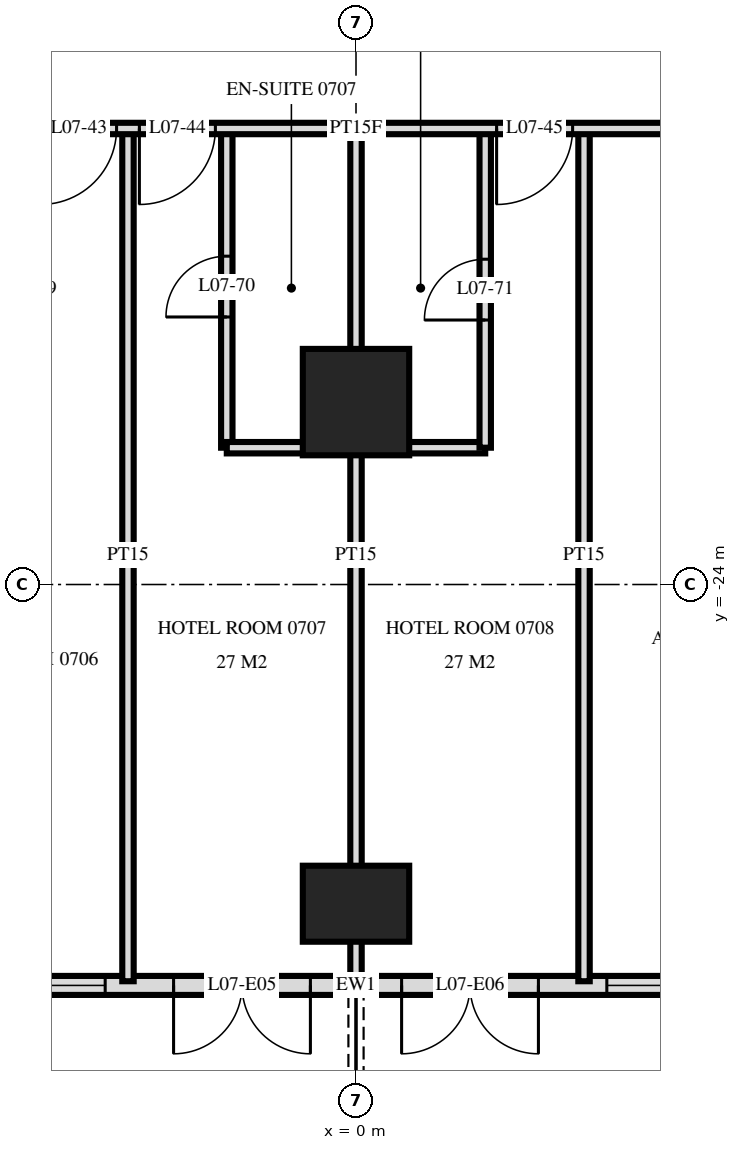
"""IFC4 building model, lengths in metres.
Left out: names, types, materials, properties, quantities, classifications, styles, units other than length and angle.
Written with IfcOpenShell. Run it as: python <this file> out.ifc"""

import sys

from ifc_helpers import new_model, si_unit, direction, frame, frame_2d, origin, origin_2d, place, context, subcontext, project, spatial, rectangle, extrude, element, fill, save


model = new_model("IFC4")
c1 = context("Model", 3, precision=1e-05, world=origin(), true_north=direction((0.0, 1.0)))
c2 = subcontext(c1, "Body", "Model", "MODEL_VIEW")
j1 = project(units=[si_unit("LENGTHUNIT", "METRE"), si_unit("PLANEANGLEUNIT", "RADIAN")], contexts=[c1])
p1 = place(None, origin())
s1 = spatial("IfcSite", under=j1, at=p1, CompositionType="ELEMENT")
p2 = place(p1, origin())
s2 = spatial("IfcBuilding", under=s1, at=p2, CompositionType="ELEMENT")
p3 = place(p2, frame((0.0, 0.0, 34.8)))
s3 = spatial("IfcBuildingStorey", under=s2, at=p3, CompositionType="ELEMENT", Elevation=34.8)
p4 = place(p3, frame((0.0, -28.2, 0.0), z_axis=(0.0, 0.0, 1.0), x_axis=(1.0, 0.0, 0.0)))
e1 = element("IfcColumn", 1, at=p4, inside=s3, PredefinedType="COLUMN", context=c2, shape_type="SweptSolid", body=[
    extrude(rectangle(XDim=1.4, YDim=1.0, at=origin_2d()), origin(), (0.0, 0.0, 1.0), 3.6),
])
p5 = place(p3, frame((0.0, -21.6, 0.0), z_axis=(0.0, 0.0, 1.0), x_axis=(1.0, 0.0, 0.0)))
e2 = element("IfcColumn", 2, at=p5, inside=s3, PredefinedType="COLUMN", context=c2, shape_type="SweptSolid", body=[
    extrude(rectangle(XDim=1.4, YDim=1.4, at=origin_2d()), origin(), (0.0, 0.0, 1.0), 3.6),
])
p6 = place(p3, frame((-28.775, -29.275, 0.0), z_axis=(0.0, 0.0, 1.0), x_axis=(1.0, 0.0, 0.0)))
e3 = element("IfcWall", 3, at=p6, inside=s3, PredefinedType="SOLIDWALL", context=c2, shape_type="SweptSolid", body=[
    extrude(rectangle(XDim=57.551, YDim=0.25, at=frame_2d((28.775, 0.0))), origin(), (0.0, 0.0, 1.0), 3.32),
])
p7 = place(p6, frame((0.575, 0.0, 0.0)))
e4 = element("IfcOpeningElement", 4, at=p7, cuts=e3, PredefinedType="OPENING", context=c2, shape_type="SweptSolid", body=[
    extrude(rectangle(XDim=1.8, YDim=2.4, at=frame_2d((0.9, 1.2))), frame((0.0, 0.135, 0.0), z_axis=(0.0, -1.0, 0.0), x_axis=(1.0, 0.0, 0.0)), (0.0, 0.0, 1.0), 0.27),
])
p8 = place(p6, frame((5.375, 0.0, 0.0)))
e5 = element("IfcOpeningElement", 5, at=p8, cuts=e3, PredefinedType="OPENING", context=c2, shape_type="SweptSolid", body=[
    extrude(rectangle(XDim=1.8, YDim=2.4, at=frame_2d((0.9, 1.2))), frame((0.0, 0.135, 0.0), z_axis=(0.0, -1.0, 0.0), x_axis=(1.0, 0.0, 0.0)), (0.0, 0.0, 1.0), 0.27),
])
p9 = place(p6, frame((8.075, 0.0, 0.3)))
e6 = element("IfcOpeningElement", 6, at=p9, cuts=e3, PredefinedType="OPENING", context=c2, shape_type="SweptSolid", body=[
    extrude(rectangle(XDim=2.4, YDim=2.1, at=frame_2d((1.2, 1.05))), frame((0.0, 0.135, 0.0), z_axis=(0.0, -1.0, 0.0), x_axis=(1.0, 0.0, 0.0)), (0.0, 0.0, 1.0), 0.27),
])
p10 = place(p6, frame((11.375, 0.0, 0.0)))
e7 = element("IfcOpeningElement", 7, at=p10, cuts=e3, PredefinedType="OPENING", context=c2, shape_type="SweptSolid", body=[
    extrude(rectangle(XDim=1.8, YDim=2.4, at=frame_2d((0.9, 1.2))), frame((0.0, 0.135, 0.0), z_axis=(0.0, -1.0, 0.0), x_axis=(1.0, 0.0, 0.0)), (0.0, 0.0, 1.0), 0.27),
])
p11 = place(p6, frame((14.075, 0.0, 0.3)))
e8 = element("IfcOpeningElement", 8, at=p11, cuts=e3, PredefinedType="OPENING", context=c2, shape_type="SweptSolid", body=[
    extrude(rectangle(XDim=2.4, YDim=2.1, at=frame_2d((1.2, 1.05))), frame((0.0, 0.135, 0.0), z_axis=(0.0, -1.0, 0.0), x_axis=(1.0, 0.0, 0.0)), (0.0, 0.0, 1.0), 0.27),
])
p12 = place(p6, frame((17.375, 0.0, 0.0)))
e9 = element("IfcOpeningElement", 9, at=p12, cuts=e3, PredefinedType="OPENING", context=c2, shape_type="SweptSolid", body=[
    extrude(rectangle(XDim=1.8, YDim=2.4, at=frame_2d((0.9, 1.2))), frame((0.0, 0.135, 0.0), z_axis=(0.0, -1.0, 0.0), x_axis=(1.0, 0.0, 0.0)), (0.0, 0.0, 1.0), 0.27),
])
p13 = place(p6, frame((20.075, 0.0, 0.3)))
e10 = element("IfcOpeningElement", 10, at=p13, cuts=e3, PredefinedType="OPENING", context=c2, shape_type="SweptSolid", body=[
    extrude(rectangle(XDim=2.4, YDim=2.1, at=frame_2d((1.2, 1.05))), frame((0.0, 0.135, 0.0), z_axis=(0.0, -1.0, 0.0), x_axis=(1.0, 0.0, 0.0)), (0.0, 0.0, 1.0), 0.27),
])
p14 = place(p6, frame((23.075, 0.0, 0.3)))
e11 = element("IfcOpeningElement", 11, at=p14, cuts=e3, PredefinedType="OPENING", context=c2, shape_type="SweptSolid", body=[
    extrude(rectangle(XDim=2.4, YDim=2.1, at=frame_2d((1.2, 1.05))), frame((0.0, 0.135, 0.0), z_axis=(0.0, -1.0, 0.0), x_axis=(1.0, 0.0, 0.0)), (0.0, 0.0, 1.0), 0.27),
])
p15 = place(p6, frame((26.375, 0.0, 0.0)))
e12 = element("IfcOpeningElement", 12, at=p15, cuts=e3, PredefinedType="OPENING", context=c2, shape_type="SweptSolid", body=[
    extrude(rectangle(XDim=1.8, YDim=2.4, at=frame_2d((0.9, 1.2))), frame((0.0, 0.135, 0.0), z_axis=(0.0, -1.0, 0.0), x_axis=(1.0, 0.0, 0.0)), (0.0, 0.0, 1.0), 0.27),
])
p16 = place(p6, frame((29.375, 0.0, 0.0)))
e13 = element("IfcOpeningElement", 13, at=p16, cuts=e3, PredefinedType="OPENING", context=c2, shape_type="SweptSolid", body=[
    extrude(rectangle(XDim=1.8, YDim=2.4, at=frame_2d((0.9, 1.2))), frame((0.0, 0.135, 0.0), z_axis=(0.0, -1.0, 0.0), x_axis=(1.0, 0.0, 0.0)), (0.0, 0.0, 1.0), 0.27),
])
p17 = place(p6, frame((32.075, 0.0, 0.3)))
e14 = element("IfcOpeningElement", 14, at=p17, cuts=e3, PredefinedType="OPENING", context=c2, shape_type="SweptSolid", body=[
    extrude(rectangle(XDim=2.4, YDim=2.1, at=frame_2d((1.2, 1.05))), frame((0.0, 0.135, 0.0), z_axis=(0.0, -1.0, 0.0), x_axis=(1.0, 0.0, 0.0)), (0.0, 0.0, 1.0), 0.27),
])
p18 = place(p6, frame((35.375, 0.0, 0.0)))
e15 = element("IfcOpeningElement", 15, at=p18, cuts=e3, PredefinedType="OPENING", context=c2, shape_type="SweptSolid", body=[
    extrude(rectangle(XDim=1.8, YDim=2.4, at=frame_2d((0.9, 1.2))), frame((0.0, 0.135, 0.0), z_axis=(0.0, -1.0, 0.0), x_axis=(1.0, 0.0, 0.0)), (0.0, 0.0, 1.0), 0.27),
])
p19 = place(p6, frame((38.075, 0.0, 0.3)))
e16 = element("IfcOpeningElement", 16, at=p19, cuts=e3, PredefinedType="OPENING", context=c2, shape_type="SweptSolid", body=[
    extrude(rectangle(XDim=2.4, YDim=2.1, at=frame_2d((1.2, 1.05))), frame((0.0, 0.135, 0.0), z_axis=(0.0, -1.0, 0.0), x_axis=(1.0, 0.0, 0.0)), (0.0, 0.0, 1.0), 0.27),
])
p20 = place(p6, frame((41.375, 0.0, 0.0)))
e17 = element("IfcOpeningElement", 17, at=p20, cuts=e3, PredefinedType="OPENING", context=c2, shape_type="SweptSolid", body=[
    extrude(rectangle(XDim=1.8, YDim=2.4, at=frame_2d((0.9, 1.2))), frame((0.0, 0.135, 0.0), z_axis=(0.0, -1.0, 0.0), x_axis=(1.0, 0.0, 0.0)), (0.0, 0.0, 1.0), 0.27),
])
p21 = place(p6, frame((44.075, 0.0, 0.3)))
e18 = element("IfcOpeningElement", 18, at=p21, cuts=e3, PredefinedType="OPENING", context=c2, shape_type="SweptSolid", body=[
    extrude(rectangle(XDim=2.4, YDim=2.1, at=frame_2d((1.2, 1.05))), frame((0.0, 0.135, 0.0), z_axis=(0.0, -1.0, 0.0), x_axis=(1.0, 0.0, 0.0)), (0.0, 0.0, 1.0), 0.27),
])
p22 = place(p6, frame((47.375, 0.0, 0.0)))
e19 = element("IfcOpeningElement", 19, at=p22, cuts=e3, PredefinedType="OPENING", context=c2, shape_type="SweptSolid", body=[
    extrude(rectangle(XDim=1.8, YDim=2.4, at=frame_2d((0.9, 1.2))), frame((0.0, 0.135, 0.0), z_axis=(0.0, -1.0, 0.0), x_axis=(1.0, 0.0, 0.0)), (0.0, 0.0, 1.0), 0.27),
])
p23 = place(p6, frame((50.075, 0.0, 0.3)))
e20 = element("IfcOpeningElement", 20, at=p23, cuts=e3, PredefinedType="OPENING", context=c2, shape_type="SweptSolid", body=[
    extrude(rectangle(XDim=2.4, YDim=2.1, at=frame_2d((1.2, 1.05))), frame((0.0, 0.135, 0.0), z_axis=(0.0, -1.0, 0.0), x_axis=(1.0, 0.0, 0.0)), (0.0, 0.0, 1.0), 0.27),
])
p24 = place(p6, frame((53.375, 0.0, 0.0)))
e21 = element("IfcOpeningElement", 21, at=p24, cuts=e3, PredefinedType="OPENING", context=c2, shape_type="SweptSolid", body=[
    extrude(rectangle(XDim=1.8, YDim=2.4, at=frame_2d((0.9, 1.2))), frame((0.0, 0.135, 0.0), z_axis=(0.0, -1.0, 0.0), x_axis=(1.0, 0.0, 0.0)), (0.0, 0.0, 1.0), 0.27),
])
p25 = place(p3, frame((3.0, -29.22, 0.0), z_axis=(0.0, 0.0, 1.0), x_axis=(0.0, 1.0, 0.0)))
e22 = element("IfcWall", 22, at=p25, inside=s3, PredefinedType="PARTITIONING", context=c2, shape_type="SweptSolid", body=[
    extrude(rectangle(XDim=11.22, YDim=0.15, at=frame_2d((5.61, 0.0))), origin(), (0.0, 0.0, 1.0), 3.32),
])
p26 = place(p3, frame((1.7, -22.2, 0.0), z_axis=(0.0, 0.0, 1.0), x_axis=(0.0, 1.0, 0.0)))
e23 = element("IfcWall", 23, at=p26, inside=s3, PredefinedType="PARTITIONING", context=c2, shape_type="SweptSolid", body=[
    extrude(rectangle(XDim=4.2, YDim=0.15, at=frame_2d((2.1, 0.0))), origin(), (0.0, 0.0, 1.0), 3.32),
])
p27 = place(p26, frame((1.68, 0.0, 0.0)))
e24 = element("IfcOpeningElement", 24, at=p27, cuts=e23, PredefinedType="OPENING", context=c2, shape_type="SweptSolid", body=[
    extrude(rectangle(XDim=0.8, YDim=2.1, at=frame_2d((0.4, 1.05))), frame((0.0, 0.085, 0.0), z_axis=(0.0, -1.0, 0.0), x_axis=(1.0, 0.0, 0.0)), (0.0, 0.0, 1.0), 0.17),
])
p28 = place(p3, frame((0.0, -29.22, 0.0), z_axis=(0.0, 0.0, 1.0), x_axis=(0.0, 1.0, 0.0)))
e25 = element("IfcWall", 25, at=p28, inside=s3, PredefinedType="PARTITIONING", context=c2, shape_type="SweptSolid", body=[
    extrude(rectangle(XDim=11.22, YDim=0.15, at=frame_2d((5.61, 0.0))), origin(), (0.0, 0.0, 1.0), 3.32),
])
p29 = place(p3, frame((-1.7, -22.2, 0.0), z_axis=(0.0, 0.0, 1.0), x_axis=(0.0, 1.0, 0.0)))
e26 = element("IfcWall", 26, at=p29, inside=s3, PredefinedType="PARTITIONING", context=c2, shape_type="SweptSolid", body=[
    extrude(rectangle(XDim=4.2, YDim=0.15, at=frame_2d((2.1, 0.0))), origin(), (0.0, 0.0, 1.0), 3.32),
])
p30 = place(p29, frame((1.72, 0.0, 0.0)))
e27 = element("IfcOpeningElement", 27, at=p30, cuts=e26, PredefinedType="OPENING", context=c2, shape_type="SweptSolid", body=[
    extrude(rectangle(XDim=0.8, YDim=2.1, at=frame_2d((0.4, 1.05))), frame((0.0, 0.085, 0.0), z_axis=(0.0, -1.0, 0.0), x_axis=(1.0, 0.0, 0.0)), (0.0, 0.0, 1.0), 0.17),
])
p31 = place(p3, frame((-3.0, -29.22, 0.0), z_axis=(0.0, 0.0, 1.0), x_axis=(0.0, 1.0, 0.0)))
e28 = element("IfcWall", 28, at=p31, inside=s3, PredefinedType="PARTITIONING", context=c2, shape_type="SweptSolid", body=[
    extrude(rectangle(XDim=11.22, YDim=0.15, at=frame_2d((5.61, 0.0))), origin(), (0.0, 0.0, 1.0), 3.32),
])
p32 = place(p3, frame((-1.7, -22.2, 0.0), z_axis=(0.0, 0.0, 1.0), x_axis=(1.0, 0.0, 0.0)))
e29 = element("IfcWall", 29, at=p32, inside=s3, PredefinedType="PARTITIONING", context=c2, shape_type="SweptSolid", body=[
    extrude(rectangle(XDim=3.4, YDim=0.15, at=frame_2d((1.7, 0.0))), origin(), (0.0, 0.0, 1.0), 3.32),
])
p33 = place(p3, frame((-33.12, -18.0, 0.0), z_axis=(0.0, 0.0, 1.0), x_axis=(1.0, 0.0, 0.0)))
e30 = element("IfcWall", 30, at=p33, inside=s3, PredefinedType="PARTITIONING", context=c2, shape_type="SweptSolid", body=[
    extrude(rectangle(XDim=66.24, YDim=0.15, at=frame_2d((33.12, 0.0))), origin(), (0.0, 0.0, 1.0), 3.32),
])
p34 = place(p33, frame((12.27, 0.0, 0.0)))
e31 = element("IfcOpeningElement", 31, at=p34, cuts=e30, PredefinedType="OPENING", context=c2, shape_type="SweptSolid", body=[
    extrude(rectangle(XDim=1.0, YDim=2.1, at=frame_2d((0.5, 1.05))), frame((0.0, 0.085, 0.0), z_axis=(0.0, -1.0, 0.0), x_axis=(1.0, 0.0, 0.0)), (0.0, 0.0, 1.0), 0.17),
])
p35 = place(p33, frame((16.97, 0.0, 0.0)))
e32 = element("IfcOpeningElement", 32, at=p35, cuts=e30, PredefinedType="OPENING", context=c2, shape_type="SweptSolid", body=[
    extrude(rectangle(XDim=1.0, YDim=2.1, at=frame_2d((0.5, 1.05))), frame((0.0, 0.085, 0.0), z_axis=(0.0, -1.0, 0.0), x_axis=(1.0, 0.0, 0.0)), (0.0, 0.0, 1.0), 0.17),
])
p36 = place(p33, frame((18.27, 0.0, 0.0)))
e33 = element("IfcOpeningElement", 33, at=p36, cuts=e30, PredefinedType="OPENING", context=c2, shape_type="SweptSolid", body=[
    extrude(rectangle(XDim=1.0, YDim=2.1, at=frame_2d((0.5, 1.05))), frame((0.0, 0.085, 0.0), z_axis=(0.0, -1.0, 0.0), x_axis=(1.0, 0.0, 0.0)), (0.0, 0.0, 1.0), 0.17),
])
p37 = place(p33, frame((22.97, 0.0, 0.0)))
e34 = element("IfcOpeningElement", 34, at=p37, cuts=e30, PredefinedType="OPENING", context=c2, shape_type="SweptSolid", body=[
    extrude(rectangle(XDim=1.0, YDim=2.1, at=frame_2d((0.5, 1.05))), frame((0.0, 0.085, 0.0), z_axis=(0.0, -1.0, 0.0), x_axis=(1.0, 0.0, 0.0)), (0.0, 0.0, 1.0), 0.17),
])
p38 = place(p33, frame((24.27, 0.0, 0.0)))
e35 = element("IfcOpeningElement", 35, at=p38, cuts=e30, PredefinedType="OPENING", context=c2, shape_type="SweptSolid", body=[
    extrude(rectangle(XDim=1.0, YDim=2.1, at=frame_2d((0.5, 1.05))), frame((0.0, 0.085, 0.0), z_axis=(0.0, -1.0, 0.0), x_axis=(1.0, 0.0, 0.0)), (0.0, 0.0, 1.0), 0.17),
])
p39 = place(p33, frame((28.97, 0.0, 0.0)))
e36 = element("IfcOpeningElement", 36, at=p39, cuts=e30, PredefinedType="OPENING", context=c2, shape_type="SweptSolid", body=[
    extrude(rectangle(XDim=1.0, YDim=2.1, at=frame_2d((0.5, 1.05))), frame((0.0, 0.085, 0.0), z_axis=(0.0, -1.0, 0.0), x_axis=(1.0, 0.0, 0.0)), (0.0, 0.0, 1.0), 0.17),
])
p40 = place(p33, frame((30.27, 0.0, 0.0)))
e37 = element("IfcOpeningElement", 37, at=p40, cuts=e30, PredefinedType="OPENING", context=c2, shape_type="SweptSolid", body=[
    extrude(rectangle(XDim=1.0, YDim=2.1, at=frame_2d((0.5, 1.05))), frame((0.0, 0.085, 0.0), z_axis=(0.0, -1.0, 0.0), x_axis=(1.0, 0.0, 0.0)), (0.0, 0.0, 1.0), 0.17),
])
p41 = place(p33, frame((34.97, 0.0, 0.0)))
e38 = element("IfcOpeningElement", 38, at=p41, cuts=e30, PredefinedType="OPENING", context=c2, shape_type="SweptSolid", body=[
    extrude(rectangle(XDim=1.0, YDim=2.1, at=frame_2d((0.5, 1.05))), frame((0.0, 0.085, 0.0), z_axis=(0.0, -1.0, 0.0), x_axis=(1.0, 0.0, 0.0)), (0.0, 0.0, 1.0), 0.17),
])
p42 = place(p33, frame((37.27, 0.0, 0.0)))
e39 = element("IfcOpeningElement", 39, at=p42, cuts=e30, PredefinedType="OPENING", context=c2, shape_type="SweptSolid", body=[
    extrude(rectangle(XDim=1.0, YDim=2.1, at=frame_2d((0.5, 1.05))), frame((0.0, 0.085, 0.0), z_axis=(0.0, -1.0, 0.0), x_axis=(1.0, 0.0, 0.0)), (0.0, 0.0, 1.0), 0.17),
])
p43 = place(p33, frame((43.97, 0.0, 0.0)))
e40 = element("IfcOpeningElement", 40, at=p43, cuts=e30, PredefinedType="OPENING", context=c2, shape_type="SweptSolid", body=[
    extrude(rectangle(XDim=1.0, YDim=2.1, at=frame_2d((0.5, 1.05))), frame((0.0, 0.085, 0.0), z_axis=(0.0, -1.0, 0.0), x_axis=(1.0, 0.0, 0.0)), (0.0, 0.0, 1.0), 0.17),
])
p44 = place(p33, frame((45.27, 0.0, 0.0)))
e41 = element("IfcOpeningElement", 41, at=p44, cuts=e30, PredefinedType="OPENING", context=c2, shape_type="SweptSolid", body=[
    extrude(rectangle(XDim=1.0, YDim=2.1, at=frame_2d((0.5, 1.05))), frame((0.0, 0.085, 0.0), z_axis=(0.0, -1.0, 0.0), x_axis=(1.0, 0.0, 0.0)), (0.0, 0.0, 1.0), 0.17),
])
p45 = place(p33, frame((51.22, 0.0, 0.0)))
e42 = element("IfcOpeningElement", 42, at=p45, cuts=e30, PredefinedType="OPENING", context=c2, shape_type="SweptSolid", body=[
    extrude(rectangle(XDim=1.0, YDim=2.1, at=frame_2d((0.5, 1.05))), frame((0.0, 0.085, 0.0), z_axis=(0.0, -1.0, 0.0), x_axis=(1.0, 0.0, 0.0)), (0.0, 0.0, 1.0), 0.17),
])
p46 = place(p33, frame((54.27, 0.0, 0.0)))
e43 = element("IfcOpeningElement", 43, at=p46, cuts=e30, PredefinedType="OPENING", context=c2, shape_type="SweptSolid", body=[
    extrude(rectangle(XDim=1.0, YDim=2.1, at=frame_2d((0.5, 1.05))), frame((0.0, 0.085, 0.0), z_axis=(0.0, -1.0, 0.0), x_axis=(1.0, 0.0, 0.0)), (0.0, 0.0, 1.0), 0.17),
])
p47 = place(p33, frame((6.07, 0.0, 0.0)))
e44 = element("IfcOpeningElement", 44, at=p47, cuts=e30, PredefinedType="OPENING", context=c2, shape_type="SweptSolid", body=[
    extrude(rectangle(XDim=1.0, YDim=2.1, at=frame_2d((0.5, 1.05))), frame((0.0, 0.085, 0.0), z_axis=(0.0, -1.0, 0.0), x_axis=(1.0, 0.0, 0.0)), (0.0, 0.0, 1.0), 0.17),
])
p48 = place(p33, frame((63.37, 0.0, 0.0)))
e45 = element("IfcOpeningElement", 45, at=p48, cuts=e30, PredefinedType="OPENING", context=c2, shape_type="SweptSolid", body=[
    extrude(rectangle(XDim=1.0, YDim=2.1, at=frame_2d((0.5, 1.05))), frame((0.0, 0.085, 0.0), z_axis=(0.0, -1.0, 0.0), x_axis=(1.0, 0.0, 0.0)), (0.0, 0.0, 1.0), 0.17),
])
p49 = place(p14, origin())
e46 = element("IfcWindow", 46, at=p49, inside=s3, PartitioningType="SINGLE_PANEL", PredefinedType="WINDOW", context=c2, shape_type="SweptSolid", body=[
    extrude(rectangle(XDim=2.4, YDim=2.1, at=frame_2d((1.2, 1.05))), frame((0.0, 0.03, 0.0), z_axis=(0.0, -1.0, 0.0), x_axis=(1.0, 0.0, 0.0)), (0.0, 0.0, 1.0), 0.06),
])
fill(e11, e46)
p50 = place(p15, frame((0.9, 0.0, 0.0), z_axis=(0.0, 0.0, 1.0), x_axis=(-1.0, 0.0, 0.0)))
e47 = element("IfcDoor", 47, at=p50, inside=s3, OperationType="DOUBLE_DOOR_SINGLE_SWING", PredefinedType="DOOR", context=c2, shape_type="SweptSolid", body=[
    extrude(rectangle(XDim=1.8, YDim=2.4, at=frame_2d((0.0, 1.2))), frame((0.0, -0.025, 0.0), z_axis=(0.0, 1.0, 0.0), x_axis=(-1.0, 0.0, 0.0)), (0.0, 0.0, 1.0), 0.05),
])
fill(e12, e47)
p51 = place(p16, frame((0.9, 0.0, 0.0), z_axis=(0.0, 0.0, 1.0), x_axis=(-1.0, 0.0, 0.0)))
e48 = element("IfcDoor", 48, at=p51, inside=s3, OperationType="DOUBLE_DOOR_SINGLE_SWING", PredefinedType="DOOR", context=c2, shape_type="SweptSolid", body=[
    extrude(rectangle(XDim=1.8, YDim=2.4, at=frame_2d((0.0, 1.2))), frame((0.0, -0.025, 0.0), z_axis=(0.0, 1.0, 0.0), x_axis=(-1.0, 0.0, 0.0)), (0.0, 0.0, 1.0), 0.05),
])
fill(e13, e48)
p52 = place(p17, origin())
e49 = element("IfcWindow", 49, at=p52, inside=s3, PartitioningType="SINGLE_PANEL", PredefinedType="WINDOW", context=c2, shape_type="SweptSolid", body=[
    extrude(rectangle(XDim=2.4, YDim=2.1, at=frame_2d((1.2, 1.05))), frame((0.0, 0.03, 0.0), z_axis=(0.0, -1.0, 0.0), x_axis=(1.0, 0.0, 0.0)), (0.0, 0.0, 1.0), 0.06),
])
fill(e14, e49)
p53 = place(p39, frame((0.5, 0.0, 0.0), z_axis=(0.0, 0.0, 1.0), x_axis=(-1.0, 0.0, 0.0)))
e50 = element("IfcDoor", 50, at=p53, inside=s3, OperationType="SINGLE_SWING_LEFT", PredefinedType="DOOR", context=c2, shape_type="SweptSolid", body=[
    extrude(rectangle(XDim=1.0, YDim=2.1, at=frame_2d((0.0, 1.05))), frame((0.0, -0.025, 0.0), z_axis=(0.0, 1.0, 0.0), x_axis=(-1.0, 0.0, 0.0)), (0.0, 0.0, 1.0), 0.05),
])
fill(e36, e50)
p54 = place(p40, frame((0.5, 0.0, 0.0), z_axis=(0.0, 0.0, 1.0), x_axis=(-1.0, 0.0, 0.0)))
e51 = element("IfcDoor", 51, at=p54, inside=s3, OperationType="SINGLE_SWING_LEFT", PredefinedType="DOOR", context=c2, shape_type="SweptSolid", body=[
    extrude(rectangle(XDim=1.0, YDim=2.1, at=frame_2d((0.0, 1.05))), frame((0.0, -0.025, 0.0), z_axis=(0.0, 1.0, 0.0), x_axis=(-1.0, 0.0, 0.0)), (0.0, 0.0, 1.0), 0.05),
])
fill(e37, e51)
p55 = place(p41, frame((0.5, 0.0, 0.0), z_axis=(0.0, 0.0, 1.0), x_axis=(-1.0, 0.0, 0.0)))
e52 = element("IfcDoor", 52, at=p55, inside=s3, OperationType="SINGLE_SWING_LEFT", PredefinedType="DOOR", context=c2, shape_type="SweptSolid", body=[
    extrude(rectangle(XDim=1.0, YDim=2.1, at=frame_2d((0.0, 1.05))), frame((0.0, -0.025, 0.0), z_axis=(0.0, 1.0, 0.0), x_axis=(-1.0, 0.0, 0.0)), (0.0, 0.0, 1.0), 0.05),
])
fill(e38, e52)
p56 = place(p30, origin())
e53 = element("IfcDoor", 53, at=p56, inside=s3, OperationType="SINGLE_SWING_RIGHT", PredefinedType="DOOR", context=c2, shape_type="SweptSolid", body=[
    extrude(rectangle(XDim=0.8, YDim=2.1, at=frame_2d((0.4, 1.05))), frame((0.0, 0.025, 0.0), z_axis=(0.0, -1.0, 0.0), x_axis=(1.0, 0.0, 0.0)), (0.0, 0.0, 1.0), 0.05),
])
fill(e27, e53)
p57 = place(p27, origin())
e54 = element("IfcDoor", 54, at=p57, inside=s3, OperationType="SINGLE_SWING_RIGHT", PredefinedType="DOOR", context=c2, shape_type="SweptSolid", body=[
    extrude(rectangle(XDim=0.8, YDim=2.1, at=frame_2d((0.4, 1.05))), frame((0.0, 0.025, 0.0), z_axis=(0.0, -1.0, 0.0), x_axis=(1.0, 0.0, 0.0)), (0.0, 0.0, 1.0), 0.05),
])
fill(e24, e54)
save(model, sys.argv[1])
